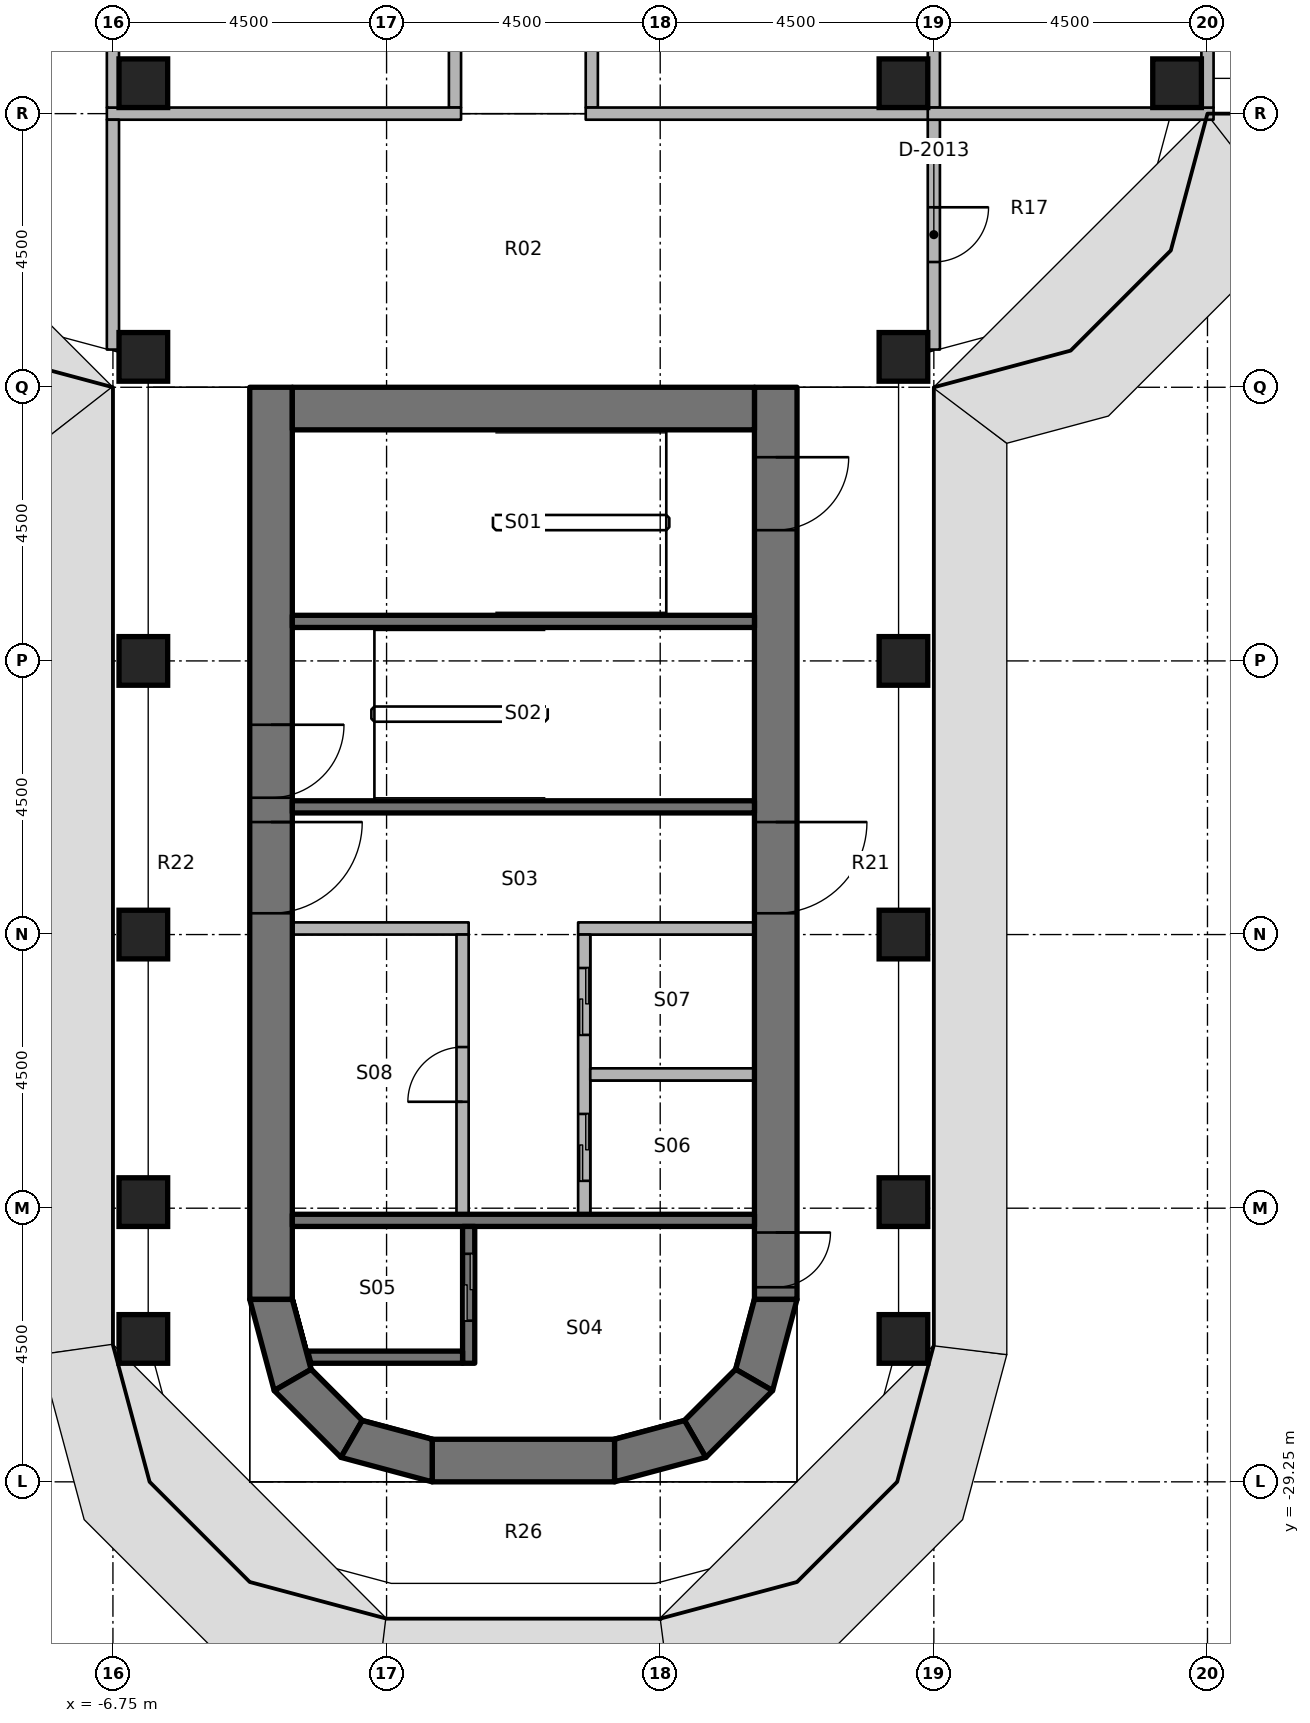
"""IFC4 building model, lengths in metres.
Left out: names, types, materials, properties, quantities, classifications, styles, units other than length and angle.
Written with IfcOpenShell. Run it as: python <this file> out.ifc"""

import sys

from ifc_helpers import new_model, si_unit, direction, frame, frame_2d, origin, origin_2d, place, context, subcontext, project, spatial, polyline, rectangle, outline, extrude, element, fill, save


model = new_model("IFC4")
c1 = context("Model", 3, precision=1e-05, world=origin(), true_north=direction((0.0, 1.0)))
c2 = subcontext(c1, "Body", "Model", "MODEL_VIEW")
j1 = project(units=[si_unit("LENGTHUNIT", "METRE"), si_unit("PLANEANGLEUNIT", "RADIAN")], contexts=[c1])
p1 = place(None, origin())
s1 = spatial("IfcSite", under=j1, at=p1, CompositionType="ELEMENT")
p2 = place(p1, origin())
s2 = spatial("IfcBuilding", under=s1, at=p2, CompositionType="ELEMENT")
p3 = place(p2, frame((0.0, 0.0, 186.6)))
s3 = spatial("IfcBuildingStorey", under=s2, at=p3, CompositionType="ELEMENT", Elevation=186.6)
for number, where, z_axis, x_axis in (
    (1, (-6.25, -26.9, 0.0), (0.0, 0.0, 1.0), (1.0, 0.0, 0.0)),
    (2, (-6.25, -24.65, 0.0), (0.0, 0.0, 1.0), (1.0, 0.0, 0.0)),
    (3, (-6.25, -20.25, 0.0), (0.0, 0.0, 1.0), (1.0, 0.0, 0.0)),
    (4, (-6.25, -15.75, 0.0), (0.0, 0.0, 1.0), (1.0, 0.0, 0.0)),
    (5, (-6.25, -10.75, 0.0), (0.0, 0.0, 1.0), (1.0, 0.0, 0.0)),
    (6, (-6.25, -6.25, 0.0), (0.0, 0.0, 1.0), (1.0, 0.0, 0.0)),
    (7, (6.25, -26.9, 0.0), (0.0, 0.0, 1.0), (1.0, 0.0, 0.0)),
    (8, (6.25, -24.65, 0.0), (0.0, 0.0, 1.0), (1.0, 0.0, 0.0)),
    (9, (6.25, -20.25, 0.0), (0.0, 0.0, 1.0), (1.0, 0.0, 0.0)),
    (10, (6.25, -15.75, 0.0), (0.0, 0.0, 1.0), (1.0, 0.0, 0.0)),
    (11, (6.25, -10.75, 0.0), (0.0, 0.0, 1.0), (1.0, 0.0, 0.0)),
    (12, (6.25, -6.25, 0.0), (0.0, 0.0, 1.0), (1.0, 0.0, 0.0)),
    (13, (10.75, -6.25, 0.0), (0.0, 0.0, 1.0), (1.0, 0.0, 0.0)),
):
    element("IfcColumn", number, at=place(p3, frame(where, z_axis=z_axis, x_axis=x_axis)), inside=s3, PredefinedType="COLUMN", context=c2, shape_type="SweptSolid", body=[
        extrude(rectangle(XDim=0.8, YDim=0.8, at=origin_2d()), origin(), (0.0, 0.0, 1.0), 3.65),
    ])
p4 = place(p3, frame((-4.15, -11.25, 0.0), z_axis=(0.0, 0.0, 1.0), x_axis=(0.0, -1.0, 0.0)))
e14 = element("IfcWall", 14, at=p4, inside=s3, PredefinedType="SHEAR", context=c2, shape_type="SweptSolid", body=[
    extrude(rectangle(XDim=15.0, YDim=0.7, at=frame_2d((7.5, 0.0))), origin(), (0.0, 0.0, 1.0), 3.8),
])
p5 = place(p4, frame((7.15, 0.0, 0.0)))
e15 = element("IfcOpeningElement", 15, at=p5, cuts=e14, PredefinedType="OPENING", context=c2, shape_type="SweptSolid", body=[
    extrude(rectangle(XDim=1.5, YDim=2.3, at=frame_2d((0.75, 1.15))), frame((0.0, 0.36, 0.0), z_axis=(0.0, -1.0, 0.0), x_axis=(1.0, 0.0, 0.0)), (0.0, 0.0, 1.0), 0.72),
])
p6 = place(p4, frame((5.55, 0.0, 0.0)))
e16 = element("IfcOpeningElement", 16, at=p6, cuts=e14, PredefinedType="OPENING", context=c2, shape_type="SweptSolid", body=[
    extrude(rectangle(XDim=1.2, YDim=2.1, at=frame_2d((0.6, 1.05))), frame((0.0, 0.36, 0.0), z_axis=(0.0, -1.0, 0.0), x_axis=(1.0, 0.0, 0.0)), (0.0, 0.0, 1.0), 0.72),
])
p7 = place(p3, frame((4.15, -11.25, 0.0), z_axis=(0.0, 0.0, 1.0), x_axis=(0.0, -1.0, 0.0)))
e17 = element("IfcWall", 17, at=p7, inside=s3, PredefinedType="SHEAR", context=c2, shape_type="SweptSolid", body=[
    extrude(rectangle(XDim=15.0, YDim=0.7, at=frame_2d((7.5, 0.0))), origin(), (0.0, 0.0, 1.0), 3.8),
])
p8 = place(p7, frame((7.15, 0.0, 0.0)))
e18 = element("IfcOpeningElement", 18, at=p8, cuts=e17, PredefinedType="OPENING", context=c2, shape_type="SweptSolid", body=[
    extrude(rectangle(XDim=1.5, YDim=2.3, at=frame_2d((0.75, 1.15))), frame((0.0, 0.36, 0.0), z_axis=(0.0, -1.0, 0.0), x_axis=(1.0, 0.0, 0.0)), (0.0, 0.0, 1.0), 0.72),
])
p9 = place(p7, frame((13.9, 0.0, 0.0)))
e19 = element("IfcOpeningElement", 19, at=p9, cuts=e17, PredefinedType="OPENING", context=c2, shape_type="SweptSolid", body=[
    extrude(rectangle(XDim=0.9, YDim=2.1, at=frame_2d((0.45, 1.05))), frame((0.0, 0.36, 0.0), z_axis=(0.0, -1.0, 0.0), x_axis=(1.0, 0.0, 0.0)), (0.0, 0.0, 1.0), 0.72),
])
p10 = place(p7, frame((1.15, 0.0, 0.0)))
e20 = element("IfcOpeningElement", 20, at=p10, cuts=e17, PredefinedType="OPENING", context=c2, shape_type="SweptSolid", body=[
    extrude(rectangle(XDim=1.2, YDim=2.1, at=frame_2d((0.6, 1.05))), frame((0.0, 0.36, 0.0), z_axis=(0.0, -1.0, 0.0), x_axis=(1.0, 0.0, 0.0)), (0.0, 0.0, 1.0), 0.72),
])
p11 = place(p3, frame((-3.8, -11.6, 0.0), z_axis=(0.0, 0.0, 1.0), x_axis=(1.0, 0.0, 0.0)))
e21 = element("IfcWall", 21, at=p11, inside=s3, PredefinedType="SHEAR", context=c2, shape_type="SweptSolid", body=[
    extrude(rectangle(XDim=7.6, YDim=0.7, at=frame_2d((3.8, 0.0))), origin(), (0.0, 0.0, 1.0), 3.8),
])
p12 = place(p3, frame((-1.5, -28.9, 0.0), z_axis=(0.0, 0.0, 1.0), x_axis=(1.0, 0.0, 0.0)))
e22 = element("IfcWall", 22, at=p12, inside=s3, PredefinedType="SHEAR", context=c2, shape_type="SweptSolid", body=[
    extrude(rectangle(XDim=3.0, YDim=0.7, at=frame_2d((1.5, 0.0))), origin(), (0.0, 0.0, 1.0), 3.8),
])
p13 = place(p3, origin())
e23 = element("IfcWall", 23, at=p13, inside=s3, PredefinedType="SHEAR", context=c2, shape_type="SweptSolid", body=[
    extrude(outline(polyline([(-4.5, -26.25), (-4.098, -27.75), (-3.492, -27.4), (-3.8, -26.25), (-4.5, -26.25)])), origin(), (0.0, 0.0, 1.0), 3.8),
])
p14 = place(p3, origin())
e24 = element("IfcWall", 24, at=p14, inside=s3, PredefinedType="SHEAR", context=c2, shape_type="SweptSolid", body=[
    extrude(outline(polyline([(-4.098, -27.75), (-3.0, -28.848), (-2.65, -28.242), (-3.492, -27.4), (-4.098, -27.75)])), origin(), (0.0, 0.0, 1.0), 3.8),
])
p15 = place(p3, origin())
e25 = element("IfcWall", 25, at=p15, inside=s3, PredefinedType="SHEAR", context=c2, shape_type="SweptSolid", body=[
    extrude(outline(polyline([(-3.0, -28.848), (-1.5, -29.25), (-1.5, -28.55), (-2.65, -28.242), (-3.0, -28.848)])), origin(), (0.0, 0.0, 1.0), 3.8),
])
p16 = place(p3, origin())
e26 = element("IfcWall", 26, at=p16, inside=s3, PredefinedType="SHEAR", context=c2, shape_type="SweptSolid", body=[
    extrude(outline(polyline([(4.5, -26.25), (4.098, -27.75), (3.492, -27.4), (3.8, -26.25), (4.5, -26.25)])), origin(), (0.0, 0.0, 1.0), 3.8),
])
p17 = place(p3, origin())
e27 = element("IfcWall", 27, at=p17, inside=s3, PredefinedType="SHEAR", context=c2, shape_type="SweptSolid", body=[
    extrude(outline(polyline([(4.098, -27.75), (3.0, -28.848), (2.65, -28.242), (3.492, -27.4), (4.098, -27.75)])), origin(), (0.0, 0.0, 1.0), 3.8),
])
p18 = place(p3, origin())
e28 = element("IfcWall", 28, at=p18, inside=s3, PredefinedType="SHEAR", context=c2, shape_type="SweptSolid", body=[
    extrude(outline(polyline([(3.0, -28.848), (1.5, -29.25), (1.5, -28.55), (2.65, -28.242), (3.0, -28.848)])), origin(), (0.0, 0.0, 1.0), 3.8),
])
p19 = place(p3, frame((3.8, -24.95, 0.0), z_axis=(0.0, 0.0, 1.0), x_axis=(-1.0, 0.0, 0.0)))
e29 = element("IfcWall", 29, at=p19, inside=s3, PredefinedType="SHEAR", context=c2, shape_type="SweptSolid", body=[
    extrude(rectangle(XDim=7.6, YDim=0.2, at=frame_2d((3.8, 0.0))), origin(), (0.0, 0.0, 1.0), 3.65),
])
p20 = place(p3, frame((-0.9, -27.3, 0.0), z_axis=(0.0, 0.0, 1.0), x_axis=(0.0, 1.0, 0.0)))
e30 = element("IfcWall", 30, at=p20, inside=s3, PredefinedType="SHEAR", context=c2, shape_type="SweptSolid", body=[
    extrude(rectangle(XDim=2.25, YDim=0.2, at=frame_2d((1.125, 0.0))), origin(), (0.0, 0.0, 1.0), 3.65),
])
p21 = place(p20, frame((0.7, 0.0, 0.0)))
e31 = element("IfcOpeningElement", 31, at=p21, cuts=e30, PredefinedType="OPENING", context=c2, shape_type="SweptSolid", body=[
    extrude(rectangle(XDim=1.1, YDim=2.3, at=frame_2d((0.55, 1.15))), frame((0.0, 0.11, 0.0), z_axis=(0.0, -1.0, 0.0), x_axis=(1.0, 0.0, 0.0)), (0.0, 0.0, 1.0), 0.22),
])
p22 = place(p3, origin())
e32 = element("IfcWall", 32, at=p22, inside=s3, PredefinedType="SHEAR", context=c2, shape_type="SweptSolid", body=[
    extrude(outline(polyline([(-1.0, -27.1), (-3.548, -27.1), (-3.494, -27.3), (-1.0, -27.3), (-1.0, -27.1)])), origin(), (0.0, 0.0, 1.0), 3.65),
])
for number, where, z_axis, x_axis in (
    (33, (3.8, -18.15, 0.0), (0.0, 0.0, 1.0), (-1.0, 0.0, 0.0)),
    (34, (3.8, -15.1, 0.0), (0.0, 0.0, 1.0), (-1.0, 0.0, 0.0)),
):
    element("IfcWall", number, at=place(p3, frame(where, z_axis=z_axis, x_axis=x_axis)), inside=s3, PredefinedType="SHEAR", context=c2, shape_type="SweptSolid", body=[
        extrude(rectangle(XDim=7.6, YDim=0.2, at=frame_2d((3.8, 0.0))), origin(), (0.0, 0.0, 1.0), 3.65),
    ])
p23 = place(p3, frame((3.8, -20.15, 0.0), z_axis=(0.0, 0.0, 1.0), x_axis=(-1.0, 0.0, 0.0)))
e35 = element("IfcWall", 35, at=p23, inside=s3, PredefinedType="PARTITIONING", context=c2, shape_type="SweptSolid", body=[
    extrude(rectangle(XDim=2.9, YDim=0.2, at=frame_2d((1.45, 0.0))), origin(), (0.0, 0.0, 1.0), 3.65),
])
p24 = place(p3, frame((1.0, -24.85, 0.0), z_axis=(0.0, 0.0, 1.0), x_axis=(0.0, 1.0, 0.0)))
e36 = element("IfcWall", 36, at=p24, inside=s3, PredefinedType="PARTITIONING", context=c2, shape_type="SweptSolid", body=[
    extrude(rectangle(XDim=4.6, YDim=0.2, at=frame_2d((2.3, 0.0))), origin(), (0.0, 0.0, 1.0), 3.65),
])
p25 = place(p24, frame((0.55, 0.0, 0.0)))
e37 = element("IfcOpeningElement", 37, at=p25, cuts=e36, PredefinedType="OPENING", context=c2, shape_type="SweptSolid", body=[
    extrude(rectangle(XDim=1.1, YDim=2.3, at=frame_2d((0.55, 1.15))), frame((0.0, 0.11, 0.0), z_axis=(0.0, -1.0, 0.0), x_axis=(1.0, 0.0, 0.0)), (0.0, 0.0, 1.0), 0.22),
])
p26 = place(p24, frame((2.95, 0.0, 0.0)))
e38 = element("IfcOpeningElement", 38, at=p26, cuts=e36, PredefinedType="OPENING", context=c2, shape_type="SweptSolid", body=[
    extrude(rectangle(XDim=1.1, YDim=2.3, at=frame_2d((0.55, 1.15))), frame((0.0, 0.11, 0.0), z_axis=(0.0, -1.0, 0.0), x_axis=(1.0, 0.0, 0.0)), (0.0, 0.0, 1.0), 0.22),
])
p27 = place(p3, frame((-0.9, -20.15, 0.0), z_axis=(0.0, 0.0, 1.0), x_axis=(-1.0, 0.0, 0.0)))
e39 = element("IfcWall", 39, at=p27, inside=s3, PredefinedType="PARTITIONING", context=c2, shape_type="SweptSolid", body=[
    extrude(rectangle(XDim=2.9, YDim=0.2, at=frame_2d((1.45, 0.0))), origin(), (0.0, 0.0, 1.0), 3.65),
])
p28 = place(p3, frame((-1.0, -24.85, 0.0), z_axis=(0.0, 0.0, 1.0), x_axis=(0.0, 1.0, 0.0)))
e40 = element("IfcWall", 40, at=p28, inside=s3, PredefinedType="PARTITIONING", context=c2, shape_type="SweptSolid", body=[
    extrude(rectangle(XDim=4.6, YDim=0.2, at=frame_2d((2.3, 0.0))), origin(), (0.0, 0.0, 1.0), 3.65),
])
p29 = place(p28, frame((1.85, 0.0, 0.0)))
e41 = element("IfcOpeningElement", 41, at=p29, cuts=e40, PredefinedType="OPENING", context=c2, shape_type="SweptSolid", body=[
    extrude(rectangle(XDim=0.9, YDim=2.1, at=frame_2d((0.45, 1.05))), frame((0.0, 0.11, 0.0), z_axis=(0.0, -1.0, 0.0), x_axis=(1.0, 0.0, 0.0)), (0.0, 0.0, 1.0), 0.22),
])
p30 = place(p3, frame((3.8, -22.55, 0.0), z_axis=(0.0, 0.0, 1.0), x_axis=(-1.0, 0.0, 0.0)))
e42 = element("IfcWall", 42, at=p30, inside=s3, PredefinedType="PARTITIONING", context=c2, shape_type="SweptSolid", body=[
    extrude(rectangle(XDim=2.7, YDim=0.2, at=frame_2d((1.35, 0.0))), origin(), (0.0, 0.0, 1.0), 3.65),
])
for number, where, z_axis, x_axis in (
    (43, (1.125, -6.65, 0.0), (0.0, 0.0, 1.0), (0.0, 1.0, 0.0)),
    (44, (-1.125, -6.65, 0.0), (0.0, 0.0, 1.0), (0.0, 1.0, 0.0)),
):
    element("IfcWall", number, at=place(p3, frame(where, z_axis=z_axis, x_axis=x_axis)), inside=s3, PredefinedType="PARTITIONING", context=c2, shape_type="SweptSolid", body=[
        extrude(rectangle(XDim=5.425, YDim=0.2, at=frame_2d((2.712, 0.0))), origin(), (0.0, 0.0, 1.0), 2.746),
    ])
p31 = place(p3, frame((1.025, -6.75, 0.0), z_axis=(0.0, 0.0, 1.0), x_axis=(1.0, 0.0, 0.0)))
e45 = element("IfcWall", 45, at=p31, inside=s3, PredefinedType="PARTITIONING", context=c2, shape_type="SweptSolid", body=[
    extrude(rectangle(XDim=5.825, YDim=0.2, at=frame_2d((2.913, 0.0))), origin(), (0.0, 0.0, 1.0), 2.746),
])
p32 = place(p3, frame((6.75, -6.85, 0.0), z_axis=(0.0, 0.0, 1.0), x_axis=(0.0, -1.0, 0.0)))
e46 = element("IfcWall", 46, at=p32, inside=s3, PredefinedType="PARTITIONING", context=c2, shape_type="SweptSolid", body=[
    extrude(rectangle(XDim=3.78, YDim=0.2, at=frame_2d((1.89, 0.0))), origin(), (0.0, 0.0, 1.0), 2.746),
])
p33 = place(p32, frame((1.44, 0.0, 0.0)))
e47 = element("IfcOpeningElement", 47, at=p33, cuts=e46, PredefinedType="OPENING", context=c2, shape_type="SweptSolid", body=[
    extrude(rectangle(XDim=0.9, YDim=2.1, at=frame_2d((0.45, 1.05))), frame((0.0, 0.11, 0.0), z_axis=(0.0, -1.0, 0.0), x_axis=(1.0, 0.0, 0.0)), (0.0, 0.0, 1.0), 0.22),
])
p34 = place(p3, frame((-6.85, -6.75, 0.0), z_axis=(0.0, 0.0, 1.0), x_axis=(1.0, 0.0, 0.0)))
e48 = element("IfcWall", 48, at=p34, inside=s3, PredefinedType="PARTITIONING", context=c2, shape_type="SweptSolid", body=[
    extrude(rectangle(XDim=5.825, YDim=0.2, at=frame_2d((2.913, 0.0))), origin(), (0.0, 0.0, 1.0), 2.746),
])
p35 = place(p3, frame((-6.75, -10.63, 0.0), z_axis=(0.0, 0.0, 1.0), x_axis=(0.0, 1.0, 0.0)))
e49 = element("IfcWall", 49, at=p35, inside=s3, PredefinedType="PARTITIONING", context=c2, shape_type="SweptSolid", body=[
    extrude(rectangle(XDim=3.78, YDim=0.2, at=frame_2d((1.89, 0.0))), origin(), (0.0, 0.0, 1.0), 2.746),
])
p36 = place(p3, frame((6.75, -6.65, 0.0), z_axis=(0.0, 0.0, 1.0), x_axis=(0.0, 1.0, 0.0)))
e50 = element("IfcWall", 50, at=p36, inside=s3, PredefinedType="PARTITIONING", context=c2, shape_type="SweptSolid", body=[
    extrude(rectangle(XDim=5.425, YDim=0.2, at=frame_2d((2.712, 0.0))), origin(), (0.0, 0.0, 1.0), 2.746),
])
p37 = place(p3, frame((6.65, -6.75, 0.0), z_axis=(0.0, 0.0, 1.0), x_axis=(1.0, 0.0, 0.0)))
e51 = element("IfcWall", 51, at=p37, inside=s3, PredefinedType="PARTITIONING", context=c2, shape_type="SweptSolid", body=[
    extrude(rectangle(XDim=4.7, YDim=0.2, at=frame_2d((2.35, 0.0))), origin(), (0.0, 0.0, 1.0), 2.746),
])
for number, where, z_axis, x_axis in (
    (52, (11.25, -6.65, 0.0), (0.0, 0.0, 1.0), (0.0, 1.0, 0.0)),
    (53, (-6.75, -6.65, 0.0), (0.0, 0.0, 1.0), (0.0, 1.0, 0.0)),
):
    element("IfcWall", number, at=place(p3, frame(where, z_axis=z_axis, x_axis=x_axis)), inside=s3, PredefinedType="PARTITIONING", context=c2, shape_type="SweptSolid", body=[
        extrude(rectangle(XDim=5.425, YDim=0.2, at=frame_2d((2.712, 0.0))), origin(), (0.0, 0.0, 1.0), 2.746),
    ])
p38 = place(p8, origin())
e54 = element("IfcDoor", 54, at=p38, inside=s3, OperationType="DOUBLE_DOOR_SINGLE_SWING", PredefinedType="DOOR", context=c2, shape_type="SweptSolid", body=[
    extrude(rectangle(XDim=1.5, YDim=2.3, at=frame_2d((0.75, 1.15))), frame((0.0, 0.025, 0.0), z_axis=(0.0, -1.0, 0.0), x_axis=(1.0, 0.0, 0.0)), (0.0, 0.0, 1.0), 0.05),
])
fill(e18, e54)
p39 = place(p5, origin())
e55 = element("IfcDoor", 55, at=p39, inside=s3, OperationType="DOUBLE_DOOR_SINGLE_SWING", PredefinedType="DOOR", context=c2, shape_type="SweptSolid", body=[
    extrude(rectangle(XDim=1.5, YDim=2.3, at=frame_2d((0.75, 1.15))), frame((0.0, 0.025, 0.0), z_axis=(0.0, -1.0, 0.0), x_axis=(1.0, 0.0, 0.0)), (0.0, 0.0, 1.0), 0.05),
])
fill(e15, e55)
p40 = place(p9, origin())
e56 = element("IfcDoor", 56, at=p40, inside=s3, OperationType="SINGLE_SWING_LEFT", PredefinedType="DOOR", context=c2, shape_type="SweptSolid", body=[
    extrude(rectangle(XDim=0.9, YDim=2.1, at=frame_2d((0.45, 1.05))), frame((0.0, 0.025, 0.0), z_axis=(0.0, -1.0, 0.0), x_axis=(1.0, 0.0, 0.0)), (0.0, 0.0, 1.0), 0.05),
])
fill(e19, e56)
p41 = place(p6, origin())
e57 = element("IfcDoor", 57, at=p41, inside=s3, OperationType="SINGLE_SWING_LEFT", PredefinedType="DOOR", context=c2, shape_type="SweptSolid", body=[
    extrude(rectangle(XDim=1.2, YDim=2.1, at=frame_2d((0.6, 1.05))), frame((0.0, 0.025, 0.0), z_axis=(0.0, -1.0, 0.0), x_axis=(1.0, 0.0, 0.0)), (0.0, 0.0, 1.0), 0.05),
])
fill(e16, e57)
p42 = place(p10, origin())
e58 = element("IfcDoor", 58, at=p42, inside=s3, OperationType="SINGLE_SWING_RIGHT", PredefinedType="DOOR", context=c2, shape_type="SweptSolid", body=[
    extrude(rectangle(XDim=1.2, YDim=2.1, at=frame_2d((0.6, 1.05))), frame((0.0, 0.025, 0.0), z_axis=(0.0, -1.0, 0.0), x_axis=(1.0, 0.0, 0.0)), (0.0, 0.0, 1.0), 0.05),
])
fill(e20, e58)
p43 = place(p21, origin())
e59 = element("IfcDoor", 59, at=p43, inside=s3, OperationType="DOUBLE_DOOR_SLIDING", PredefinedType="DOOR", context=c2, shape_type="SweptSolid", body=[
    extrude(rectangle(XDim=1.1, YDim=2.3, at=frame_2d((0.55, 1.15))), frame((0.0, 0.025, 0.0), z_axis=(0.0, -1.0, 0.0), x_axis=(1.0, 0.0, 0.0)), (0.0, 0.0, 1.0), 0.05),
])
fill(e31, e59)
p44 = place(p25, origin())
e60 = element("IfcDoor", 60, at=p44, inside=s3, OperationType="DOUBLE_DOOR_SLIDING", PredefinedType="DOOR", context=c2, shape_type="SweptSolid", body=[
    extrude(rectangle(XDim=1.1, YDim=2.3, at=frame_2d((0.55, 1.15))), frame((0.0, 0.025, 0.0), z_axis=(0.0, -1.0, 0.0), x_axis=(1.0, 0.0, 0.0)), (0.0, 0.0, 1.0), 0.05),
])
fill(e37, e60)
p45 = place(p26, origin())
e61 = element("IfcDoor", 61, at=p45, inside=s3, OperationType="DOUBLE_DOOR_SLIDING", PredefinedType="DOOR", context=c2, shape_type="SweptSolid", body=[
    extrude(rectangle(XDim=1.1, YDim=2.3, at=frame_2d((0.55, 1.15))), frame((0.0, 0.025, 0.0), z_axis=(0.0, -1.0, 0.0), x_axis=(1.0, 0.0, 0.0)), (0.0, 0.0, 1.0), 0.05),
])
fill(e38, e61)
p46 = place(p29, origin())
e62 = element("IfcDoor", 62, at=p46, inside=s3, OperationType="SINGLE_SWING_RIGHT", PredefinedType="DOOR", context=c2, shape_type="SweptSolid", body=[
    extrude(rectangle(XDim=0.9, YDim=2.1, at=frame_2d((0.45, 1.05))), frame((0.0, 0.025, 0.0), z_axis=(0.0, -1.0, 0.0), x_axis=(1.0, 0.0, 0.0)), (0.0, 0.0, 1.0), 0.05),
])
fill(e41, e62)
p47 = place(p33, origin())
e63 = element("IfcDoor", 63, at=p47, inside=s3, OperationType="SINGLE_SWING_LEFT", PredefinedType="DOOR", context=c2, shape_type="SweptSolid", body=[
    extrude(rectangle(XDim=0.9, YDim=2.1, at=frame_2d((0.45, 1.05))), frame((0.0, 0.025, 0.0), z_axis=(0.0, -1.0, 0.0), x_axis=(1.0, 0.0, 0.0)), (0.0, 0.0, 1.0), 0.05),
])
fill(e47, e63)
save(model, sys.argv[1])
